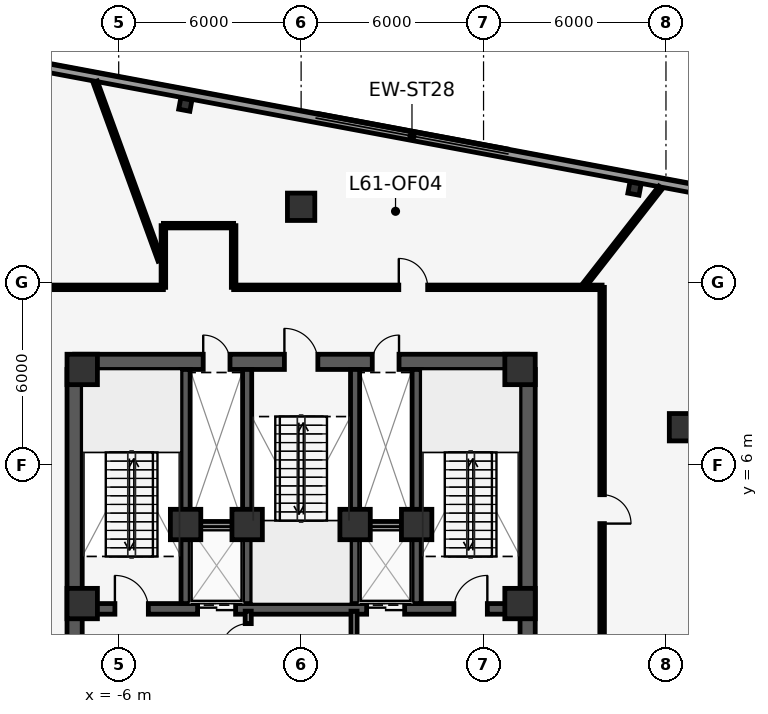
"""IFC4 building model, lengths in metres.
Left out: names, types, materials, properties, quantities, classifications, styles, units other than length and angle.
Written with IfcOpenShell. Run it as: python <this file> out.ifc"""

import sys

from ifc_helpers import new_model, si_unit, direction, frame, frame_2d, origin, origin_2d, place, context, subcontext, project, spatial, rectangle, i_section, extrude, element, fill, save


model = new_model("IFC4")
c1 = context("Model", 3, precision=1e-05, world=origin(), true_north=direction((0.0, 1.0)))
c2 = subcontext(c1, "Body", "Model", "MODEL_VIEW")
j1 = project(units=[si_unit("LENGTHUNIT", "METRE"), si_unit("PLANEANGLEUNIT", "RADIAN")], contexts=[c1])
p1 = place(None, origin())
s1 = spatial("IfcSite", under=j1, at=p1, CompositionType="ELEMENT")
p2 = place(p1, origin())
s2 = spatial("IfcBuilding", under=s1, at=p2, CompositionType="ELEMENT")
p3 = place(p2, frame((0.0, 0.0, 260.9)))
s3 = spatial("IfcBuildingStorey", under=s2, at=p3, CompositionType="ELEMENT", Elevation=260.9)
p4 = place(p3, frame((-7.45, 9.4, 0.0), z_axis=(0.0, 0.0, 1.0), x_axis=(1.0, 0.0, 0.0)))
e1 = element("IfcWall", 1, at=p4, inside=s3, PredefinedType="SHEAR", context=c2, shape_type="SweptSolid", body=[
    extrude(rectangle(XDim=14.9, YDim=0.5, at=frame_2d((7.45, 0.0))), origin(), (0.0, 0.0, 1.0), 4.35),
])
p5 = place(p4, frame((6.9, 0.0, 0.0)))
e2 = element("IfcOpeningElement", 2, at=p5, cuts=e1, PredefinedType="OPENING", context=c2, shape_type="SweptSolid", body=[
    extrude(rectangle(XDim=1.1, YDim=2.15, at=frame_2d((0.55, 1.075))), frame((0.0, 0.26, 0.0), z_axis=(0.0, -1.0, 0.0), x_axis=(1.0, 0.0, 0.0)), (0.0, 0.0, 1.0), 0.52),
])
p6 = place(p4, frame((4.23, 0.0, 0.0)))
e3 = element("IfcOpeningElement", 3, at=p6, cuts=e1, PredefinedType="OPENING", context=c2, shape_type="SweptSolid", body=[
    extrude(rectangle(XDim=0.88, YDim=2.15, at=frame_2d((0.44, 1.075))), frame((0.0, 0.26, 0.0), z_axis=(0.0, -1.0, 0.0), x_axis=(1.0, 0.0, 0.0)), (0.0, 0.0, 1.0), 0.52),
])
p7 = place(p4, frame((9.79, 0.0, 0.0)))
e4 = element("IfcOpeningElement", 4, at=p7, cuts=e1, PredefinedType="OPENING", context=c2, shape_type="SweptSolid", body=[
    extrude(rectangle(XDim=0.88, YDim=2.15, at=frame_2d((0.44, 1.075))), frame((0.0, 0.26, 0.0), z_axis=(0.0, -1.0, 0.0), x_axis=(1.0, 0.0, 0.0)), (0.0, 0.0, 1.0), 0.52),
])
p8 = place(p3, frame((-7.2, 1.275, 0.0), z_axis=(0.0, 0.0, 1.0), x_axis=(1.0, 0.0, 0.0)))
e5 = element("IfcWall", 5, at=p8, inside=s3, PredefinedType="SHEAR", context=c2, shape_type="SweptSolid", body=[
    extrude(rectangle(XDim=14.4, YDim=0.35, at=frame_2d((7.2, 0.0))), origin(), (0.0, 0.0, 1.0), 4.35),
])
p9 = place(p8, frame((3.795, 0.0, 0.0)))
e6 = element("IfcOpeningElement", 6, at=p9, cuts=e5, PredefinedType="OPENING", context=c2, shape_type="SweptSolid", body=[
    extrude(rectangle(XDim=1.25, YDim=2.25, at=frame_2d((0.625, 1.125))), frame((0.0, 0.185, 0.0), z_axis=(0.0, -1.0, 0.0), x_axis=(1.0, 0.0, 0.0)), (0.0, 0.0, 1.0), 0.37),
])
p10 = place(p8, frame((9.355, 0.0, 0.0)))
e7 = element("IfcOpeningElement", 7, at=p10, cuts=e5, PredefinedType="OPENING", context=c2, shape_type="SweptSolid", body=[
    extrude(rectangle(XDim=1.25, YDim=2.25, at=frame_2d((0.625, 1.125))), frame((0.0, 0.185, 0.0), z_axis=(0.0, -1.0, 0.0), x_axis=(1.0, 0.0, 0.0)), (0.0, 0.0, 1.0), 0.37),
])
p11 = place(p8, frame((1.075, 0.0, 0.0)))
e8 = element("IfcOpeningElement", 8, at=p11, cuts=e5, PredefinedType="OPENING", context=c2, shape_type="SweptSolid", body=[
    extrude(rectangle(XDim=1.1, YDim=2.15, at=frame_2d((0.55, 1.075))), frame((0.0, 0.185, 0.0), z_axis=(0.0, -1.0, 0.0), x_axis=(1.0, 0.0, 0.0)), (0.0, 0.0, 1.0), 0.37),
])
p12 = place(p8, frame((12.225, 0.0, 0.0)))
e9 = element("IfcOpeningElement", 9, at=p12, cuts=e5, PredefinedType="OPENING", context=c2, shape_type="SweptSolid", body=[
    extrude(rectangle(XDim=1.1, YDim=2.15, at=frame_2d((0.55, 1.075))), frame((0.0, 0.185, 0.0), z_axis=(0.0, -1.0, 0.0), x_axis=(1.0, 0.0, 0.0)), (0.0, 0.0, 1.0), 0.37),
])
for number, where, z_axis, x_axis in (
    (10, (-3.8, 1.45, 0.0), (0.0, 0.0, 1.0), (0.0, 1.0, 0.0)),
    (11, (-1.775, 1.45, 0.0), (0.0, 0.0, 1.0), (0.0, 1.0, 0.0)),
    (12, (1.775, 1.45, 0.0), (0.0, 0.0, 1.0), (0.0, 1.0, 0.0)),
    (13, (3.8, 1.45, 0.0), (0.0, 0.0, 1.0), (0.0, 1.0, 0.0)),
):
    element("IfcWall", number, at=place(p3, frame(where, z_axis=z_axis, x_axis=x_axis)), inside=s3, PredefinedType="SHEAR", context=c2, shape_type="SweptSolid", body=[
        extrude(rectangle(XDim=7.7, YDim=0.3, at=frame_2d((3.85, 0.0))), origin(), (0.0, 0.0, 1.0), 4.35),
    ])
for number, where, z_axis, x_axis in (
    (14, (-7.45, 0.1, 0.0), (0.0, 0.0, 1.0), (0.0, 1.0, 0.0)),
    (15, (7.45, 0.1, 0.0), (0.0, 0.0, 1.0), (0.0, 1.0, 0.0)),
):
    element("IfcWall", number, at=place(p3, frame(where, z_axis=z_axis, x_axis=x_axis)), inside=s3, PredefinedType="SHEAR", context=c2, shape_type="SweptSolid", body=[
        extrude(rectangle(XDim=9.05, YDim=0.5, at=frame_2d((4.525, 0.0))), origin(), (0.0, 0.0, 1.0), 4.35),
    ])
for number, where, z_axis, x_axis in (
    (16, (7.2, 1.45, 0.0), (0.0, 0.0, 1.0), (1.0, 0.0, 0.0)),
    (17, (7.2, 9.15, 0.0), (0.0, 0.0, 1.0), (1.0, 0.0, 0.0)),
    (18, (-7.2, 9.15, 0.0), (0.0, 0.0, 1.0), (1.0, 0.0, 0.0)),
    (19, (-7.2, 1.45, 0.0), (0.0, 0.0, 1.0), (1.0, 0.0, 0.0)),
    (20, (-3.8, 4.05, 0.0), (0.0, 0.0, 1.0), (1.0, 0.0, 0.0)),
    (21, (3.8, 4.05, 0.0), (0.0, 0.0, 1.0), (1.0, 0.0, 0.0)),
    (22, (-1.775, 4.05, 0.0), (0.0, 0.0, 1.0), (1.0, 0.0, 0.0)),
    (23, (1.775, 4.05, 0.0), (0.0, 0.0, 1.0), (1.0, 0.0, 0.0)),
):
    element("IfcColumn", number, at=place(p3, frame(where, z_axis=z_axis, x_axis=x_axis)), inside=s3, PredefinedType="COLUMN", context=c2, shape_type="SweptSolid", body=[
        extrude(rectangle(XDim=1.0, YDim=1.0, at=origin_2d()), origin(), (0.0, 0.0, 1.0), 4.6),
    ])
for number, where, z_axis, x_axis in (
    (24, (12.56, 7.25, 0.0), (0.0, 0.0, 1.0), (1.0, 0.0, 0.0)),
    (25, (0.0, 14.5, 0.0), (0.0, 0.0, 1.0), (1.0, 0.0, 0.0)),
):
    element("IfcColumn", number, at=place(p3, frame(where, z_axis=z_axis, x_axis=x_axis)), inside=s3, PredefinedType="COLUMN", context=c2, shape_type="SweptSolid", body=[
        extrude(rectangle(XDim=0.9, YDim=0.9, at=origin_2d()), origin(), (0.0, 0.0, 1.0), 4.6),
    ])
for number, where, z_axis, x_axis in (
    (26, (10.965, 15.099, 0.0), (0.0, 0.0, 1.0), (-0.983, 0.184, 0.0)),
    (27, (-3.809, 17.859, 0.0), (0.0, 0.0, 1.0), (-0.983, 0.184, 0.0)),
):
    element("IfcColumn", number, at=place(p3, frame(where, z_axis=z_axis, x_axis=x_axis)), inside=s3, PredefinedType="COLUMN", context=c2, shape_type="SweptSolid", body=[
        extrude(i_section(OverallWidth=0.373, OverallDepth=0.373, WebThickness=0.016, FlangeThickness=0.026, at=origin_2d()), origin(), (0.0, 0.0, 1.0), 4.6),
    ])
p13 = place(p3, frame((-19.042, 21.066, 0.0), z_axis=(0.0, 0.0, 1.0), x_axis=(0.982948140881, -0.183882985453, 0.0)))
e28 = element("IfcWall", 28, at=p13, inside=s3, PredefinedType="STANDARD", context=c2, shape_type="SweptSolid", body=[
    extrude(rectangle(XDim=46.163, YDim=0.28, at=frame_2d((23.081, 0.0))), origin(), (0.0, 0.0, 1.0), 4.35),
])
p14 = place(p13, frame((5.731, 0.0, 0.85)))
e29 = element("IfcOpeningElement", 29, at=p14, cuts=e28, PredefinedType="OPENING", context=c2, shape_type="SweptSolid", body=[
    extrude(rectangle(XDim=1.1, YDim=2.15, at=frame_2d((0.55, 1.075))), frame((0.0, 0.15, 0.0), z_axis=(0.0, -1.0, 0.0), x_axis=(1.0, 0.0, 0.0)), (0.0, 0.0, 1.0), 0.3),
])
p15 = place(p13, frame((33.731, 0.0, 0.85)))
e30 = element("IfcOpeningElement", 30, at=p15, cuts=e28, PredefinedType="OPENING", context=c2, shape_type="SweptSolid", body=[
    extrude(rectangle(XDim=1.1, YDim=2.15, at=frame_2d((0.55, 1.075))), frame((0.0, 0.15, 0.0), z_axis=(0.0, -1.0, 0.0), x_axis=(1.0, 0.0, 0.0)), (0.0, 0.0, 1.0), 0.3),
])
p16 = place(p13, frame((39.331, 0.0, 0.85)))
e31 = element("IfcOpeningElement", 31, at=p16, cuts=e28, PredefinedType="OPENING", context=c2, shape_type="SweptSolid", body=[
    extrude(rectangle(XDim=1.1, YDim=2.15, at=frame_2d((0.55, 1.075))), frame((0.0, 0.15, 0.0), z_axis=(0.0, -1.0, 0.0), x_axis=(1.0, 0.0, 0.0)), (0.0, 0.0, 1.0), 0.3),
])
p17 = place(p3, frame((28.531, 6.268, 0.0), z_axis=(0.0, 0.0, 1.0), x_axis=(-0.656055748756, -0.754712431674, 0.0)))
e32 = element("IfcWall", 32, at=p17, inside=s3, PredefinedType="STANDARD", context=c2, shape_type="SweptSolid", body=[
    extrude(rectangle(XDim=46.897, YDim=0.28, at=frame_2d((23.448, 0.0))), origin(), (0.0, 0.0, 1.0), 4.35),
])
p18 = place(p17, frame((6.099, 0.0, 0.85)))
e33 = element("IfcOpeningElement", 33, at=p18, cuts=e32, PredefinedType="OPENING", context=c2, shape_type="SweptSolid", body=[
    extrude(rectangle(XDim=1.1, YDim=2.15, at=frame_2d((0.55, 1.075))), frame((0.0, 0.15, 0.0), z_axis=(0.0, -1.0, 0.0), x_axis=(1.0, 0.0, 0.0)), (0.0, 0.0, 1.0), 0.3),
])
p19 = place(p17, frame((11.698, 0.0, 0.85)))
e34 = element("IfcOpeningElement", 34, at=p19, cuts=e32, PredefinedType="OPENING", context=c2, shape_type="SweptSolid", body=[
    extrude(rectangle(XDim=1.1, YDim=2.15, at=frame_2d((0.55, 1.075))), frame((0.0, 0.15, 0.0), z_axis=(0.0, -1.0, 0.0), x_axis=(1.0, 0.0, 0.0)), (0.0, 0.0, 1.0), 0.3),
])
p20 = place(p17, frame((39.698, 0.0, 0.85)))
e35 = element("IfcOpeningElement", 35, at=p20, cuts=e32, PredefinedType="OPENING", context=c2, shape_type="SweptSolid", body=[
    extrude(rectangle(XDim=1.1, YDim=2.15, at=frame_2d((0.55, 1.075))), frame((0.0, 0.15, 0.0), z_axis=(0.0, -1.0, 0.0), x_axis=(1.0, 0.0, 0.0)), (0.0, 0.0, 1.0), 0.3),
])
for number, where, z_axis, x_axis in (
    (36, (-3.65, 4.05, 0.0), (0.0, 0.0, 1.0), (1.0, 0.0, 0.0)),
    (37, (1.92, 4.05, 0.0), (0.0, 0.0, 1.0), (1.0, 0.0, 0.0)),
):
    element("IfcWall", number, at=place(p3, frame(where, z_axis=z_axis, x_axis=x_axis)), inside=s3, PredefinedType="PARTITIONING", context=c2, shape_type="SweptSolid", body=[
        extrude(rectangle(XDim=1.73, YDim=0.2, at=frame_2d((0.865, 0.0))), origin(), (0.0, 0.0, 1.0), 4.35),
    ])
p21 = place(p3, frame((-1.74, -1.78, 0.0), z_axis=(0.0, 0.0, 1.0), x_axis=(0.0, 1.0, 0.0)))
e38 = element("IfcWall", 38, at=p21, inside=s3, PredefinedType="PARTITIONING", context=c2, shape_type="SweptSolid", body=[
    extrude(rectangle(XDim=2.98, YDim=0.2, at=frame_2d((1.49, 0.0))), origin(), (0.0, 0.0, 1.0), 4.35),
])
p22 = place(p21, frame((1.69, 0.0, 0.0)))
e39 = element("IfcOpeningElement", 39, at=p22, cuts=e38, PredefinedType="OPENING", context=c2, shape_type="SweptSolid", body=[
    extrude(rectangle(XDim=0.88, YDim=2.15, at=frame_2d((0.44, 1.075))), frame((0.0, 0.11, 0.0), z_axis=(0.0, -1.0, 0.0), x_axis=(1.0, 0.0, 0.0)), (0.0, 0.0, 1.0), 0.22),
])
p23 = place(p3, frame((1.74, -1.78, 0.0), z_axis=(0.0, 0.0, 1.0), x_axis=(0.0, 1.0, 0.0)))
e40 = element("IfcWall", 40, at=p23, inside=s3, PredefinedType="PARTITIONING", context=c2, shape_type="SweptSolid", body=[
    extrude(rectangle(XDim=2.98, YDim=0.2, at=frame_2d((1.49, 0.0))), origin(), (0.0, 0.0, 1.0), 4.35),
])
p24 = place(p23, frame((0.24, 0.0, 0.0)))
e41 = element("IfcOpeningElement", 41, at=p24, cuts=e40, PredefinedType="OPENING", context=c2, shape_type="SweptSolid", body=[
    extrude(rectangle(XDim=0.88, YDim=2.15, at=frame_2d((0.44, 1.075))), frame((0.0, 0.11, 0.0), z_axis=(0.0, -1.0, 0.0), x_axis=(1.0, 0.0, 0.0)), (0.0, 0.0, 1.0), 0.22),
])
p25 = place(p3, frame((-9.9, 11.85, 0.0), z_axis=(0.0, 0.0, 1.0), x_axis=(1.0, 0.0, 0.0)))
e42 = element("IfcWall", 42, at=p25, inside=s3, PredefinedType="PARTITIONING", context=c2, shape_type="SweptSolid", body=[
    extrude(rectangle(XDim=5.37, YDim=0.15, at=frame_2d((2.685, 0.0))), origin(), (0.0, 0.0, 1.0), 4.35),
])
p26 = place(p3, frame((-4.53, 11.85, 0.0), z_axis=(0.0, 0.0, 1.0), x_axis=(0.0, 1.0, 0.0)))
e43 = element("IfcWall", 43, at=p26, inside=s3, PredefinedType="PARTITIONING", context=c2, shape_type="SweptSolid", body=[
    extrude(rectangle(XDim=2.03, YDim=0.15, at=frame_2d((1.015, 0.0))), origin(), (0.0, 0.0, 1.0), 4.35),
])
p27 = place(p3, frame((-4.53, 13.88, 0.0), z_axis=(0.0, 0.0, 1.0), x_axis=(1.0, 0.0, 0.0)))
e44 = element("IfcWall", 44, at=p27, inside=s3, PredefinedType="PARTITIONING", context=c2, shape_type="SweptSolid", body=[
    extrude(rectangle(XDim=2.31, YDim=0.15, at=frame_2d((1.155, 0.0))), origin(), (0.0, 0.0, 1.0), 4.35),
])
p28 = place(p3, frame((-2.22, 13.88, 0.0), z_axis=(0.0, 0.0, 1.0), x_axis=(0.0, -1.0, 0.0)))
e45 = element("IfcWall", 45, at=p28, inside=s3, PredefinedType="PARTITIONING", context=c2, shape_type="SweptSolid", body=[
    extrude(rectangle(XDim=2.03, YDim=0.15, at=frame_2d((1.015, 0.0))), origin(), (0.0, 0.0, 1.0), 4.35),
])
p29 = place(p3, frame((-2.22, 11.85, 0.0), z_axis=(0.0, 0.0, 1.0), x_axis=(1.0, 0.0, 0.0)))
e46 = element("IfcWall", 46, at=p29, inside=s3, PredefinedType="PARTITIONING", context=c2, shape_type="SweptSolid", body=[
    extrude(rectangle(XDim=12.12, YDim=0.15, at=frame_2d((6.06, 0.0))), origin(), (0.0, 0.0, 1.0), 4.35),
])
p30 = place(p29, frame((5.432, 0.0, 0.0)))
e47 = element("IfcOpeningElement", 47, at=p30, cuts=e46, PredefinedType="OPENING", context=c2, shape_type="SweptSolid", body=[
    extrude(rectangle(XDim=0.95, YDim=2.15, at=frame_2d((0.475, 1.075))), frame((0.0, 0.085, 0.0), z_axis=(0.0, -1.0, 0.0), x_axis=(1.0, 0.0, 0.0)), (0.0, 0.0, 1.0), 0.17),
])
p31 = place(p3, frame((9.9, 11.85, 0.0), z_axis=(0.0, 0.0, 1.0), x_axis=(0.0, -1.0, 0.0)))
e48 = element("IfcWall", 48, at=p31, inside=s3, PredefinedType="PARTITIONING", context=c2, shape_type="SweptSolid", body=[
    extrude(rectangle(XDim=22.634, YDim=0.15, at=frame_2d((11.317, 0.0))), origin(), (0.0, 0.0, 1.0), 4.35),
])
p32 = place(p31, frame((17.885, 0.0, 0.0)))
e49 = element("IfcOpeningElement", 49, at=p32, cuts=e48, PredefinedType="OPENING", context=c2, shape_type="SweptSolid", body=[
    extrude(rectangle(XDim=0.95, YDim=2.15, at=frame_2d((0.475, 1.075))), frame((0.0, 0.085, 0.0), z_axis=(0.0, -1.0, 0.0), x_axis=(1.0, 0.0, 0.0)), (0.0, 0.0, 1.0), 0.17),
])
p33 = place(p31, frame((6.82, 0.0, 0.0)))
e50 = element("IfcOpeningElement", 50, at=p33, cuts=e48, PredefinedType="OPENING", context=c2, shape_type="SweptSolid", body=[
    extrude(rectangle(XDim=0.95, YDim=2.15, at=frame_2d((0.475, 1.075))), frame((0.0, 0.085, 0.0), z_axis=(0.0, -1.0, 0.0), x_axis=(1.0, 0.0, 0.0)), (0.0, 0.0, 1.0), 0.17),
])
p34 = place(p3, frame((9.34, 11.955, 0.0), z_axis=(0.0, 0.0, 1.0), x_axis=(0.615673396763, 0.788001439414, 0.0)))
e51 = element("IfcWall", 51, at=p34, inside=s3, PredefinedType="PARTITIONING", context=c2, shape_type="SweptSolid", body=[
    extrude(rectangle(XDim=4.035, YDim=0.15, at=frame_2d((2.018, 0.0))), origin(), (0.0, 0.0, 1.0), 4.35),
])
p35 = place(p3, frame((-4.635, 12.735, 0.0), z_axis=(0.0, 0.0, 1.0), x_axis=(-0.34201562332, 0.939694265921, 0.0)))
e52 = element("IfcWall", 52, at=p35, inside=s3, PredefinedType="PARTITIONING", context=c2, shape_type="SweptSolid", body=[
    extrude(rectangle(XDim=6.257, YDim=0.15, at=frame_2d((3.128, 0.0))), origin(), (0.0, 0.0, 1.0), 4.35),
])
p36 = place(p9, origin())
e53 = element("IfcDoor", 53, at=p36, inside=s3, OperationType="DOUBLE_DOOR_SLIDING", PredefinedType="DOOR", context=c2, shape_type="SweptSolid", body=[
    extrude(rectangle(XDim=1.25, YDim=2.25, at=frame_2d((0.625, 1.125))), frame((0.0, 0.025, 0.0), z_axis=(0.0, -1.0, 0.0), x_axis=(1.0, 0.0, 0.0)), (0.0, 0.0, 1.0), 0.05),
])
fill(e6, e53)
p37 = place(p10, origin())
e54 = element("IfcDoor", 54, at=p37, inside=s3, OperationType="DOUBLE_DOOR_SLIDING", PredefinedType="DOOR", context=c2, shape_type="SweptSolid", body=[
    extrude(rectangle(XDim=1.25, YDim=2.25, at=frame_2d((0.625, 1.125))), frame((0.0, 0.025, 0.0), z_axis=(0.0, -1.0, 0.0), x_axis=(1.0, 0.0, 0.0)), (0.0, 0.0, 1.0), 0.05),
])
fill(e7, e54)
p38 = place(p11, origin())
e55 = element("IfcDoor", 55, at=p38, inside=s3, OperationType="SINGLE_SWING_LEFT", PredefinedType="DOOR", context=c2, shape_type="SweptSolid", body=[
    extrude(rectangle(XDim=1.1, YDim=2.15, at=frame_2d((0.55, 1.075))), frame((0.0, 0.025, 0.0), z_axis=(0.0, -1.0, 0.0), x_axis=(1.0, 0.0, 0.0)), (0.0, 0.0, 1.0), 0.05),
])
fill(e8, e55)
p39 = place(p12, origin())
e56 = element("IfcDoor", 56, at=p39, inside=s3, OperationType="SINGLE_SWING_RIGHT", PredefinedType="DOOR", context=c2, shape_type="SweptSolid", body=[
    extrude(rectangle(XDim=1.1, YDim=2.15, at=frame_2d((0.55, 1.075))), frame((0.0, 0.025, 0.0), z_axis=(0.0, -1.0, 0.0), x_axis=(1.0, 0.0, 0.0)), (0.0, 0.0, 1.0), 0.05),
])
fill(e9, e56)
p40 = place(p5, origin())
e57 = element("IfcDoor", 57, at=p40, inside=s3, OperationType="SINGLE_SWING_LEFT", PredefinedType="DOOR", context=c2, shape_type="SweptSolid", body=[
    extrude(rectangle(XDim=1.1, YDim=2.15, at=frame_2d((0.55, 1.075))), frame((0.0, 0.025, 0.0), z_axis=(0.0, -1.0, 0.0), x_axis=(1.0, 0.0, 0.0)), (0.0, 0.0, 1.0), 0.05),
])
fill(e2, e57)
p41 = place(p6, origin())
e58 = element("IfcDoor", 58, at=p41, inside=s3, OperationType="SINGLE_SWING_LEFT", PredefinedType="DOOR", context=c2, shape_type="SweptSolid", body=[
    extrude(rectangle(XDim=0.88, YDim=2.15, at=frame_2d((0.44, 1.075))), frame((0.0, 0.025, 0.0), z_axis=(0.0, -1.0, 0.0), x_axis=(1.0, 0.0, 0.0)), (0.0, 0.0, 1.0), 0.05),
])
fill(e3, e58)
p42 = place(p7, origin())
e59 = element("IfcDoor", 59, at=p42, inside=s3, OperationType="SINGLE_SWING_RIGHT", PredefinedType="DOOR", context=c2, shape_type="SweptSolid", body=[
    extrude(rectangle(XDim=0.88, YDim=2.15, at=frame_2d((0.44, 1.075))), frame((0.0, 0.025, 0.0), z_axis=(0.0, -1.0, 0.0), x_axis=(1.0, 0.0, 0.0)), (0.0, 0.0, 1.0), 0.05),
])
fill(e4, e59)
p43 = place(p22, origin())
e60 = element("IfcDoor", 60, at=p43, inside=s3, OperationType="SINGLE_SWING_LEFT", PredefinedType="DOOR", context=c2, shape_type="SweptSolid", body=[
    extrude(rectangle(XDim=0.88, YDim=2.15, at=frame_2d((0.44, 1.075))), frame((0.0, 0.025, 0.0), z_axis=(0.0, -1.0, 0.0), x_axis=(1.0, 0.0, 0.0)), (0.0, 0.0, 1.0), 0.05),
])
fill(e39, e60)
p44 = place(p33, origin())
e61 = element("IfcDoor", 61, at=p44, inside=s3, OperationType="SINGLE_SWING_RIGHT", PredefinedType="DOOR", context=c2, shape_type="SweptSolid", body=[
    extrude(rectangle(XDim=0.95, YDim=2.15, at=frame_2d((0.475, 1.075))), frame((0.0, 0.025, 0.0), z_axis=(0.0, -1.0, 0.0), x_axis=(1.0, 0.0, 0.0)), (0.0, 0.0, 1.0), 0.05),
])
fill(e50, e61)
p45 = place(p30, origin())
e62 = element("IfcDoor", 62, at=p45, inside=s3, OperationType="SINGLE_SWING_LEFT", PredefinedType="DOOR", context=c2, shape_type="SweptSolid", body=[
    extrude(rectangle(XDim=0.95, YDim=2.15, at=frame_2d((0.475, 1.075))), frame((0.0, 0.025, 0.0), z_axis=(0.0, -1.0, 0.0), x_axis=(1.0, 0.0, 0.0)), (0.0, 0.0, 1.0), 0.05),
])
fill(e47, e62)
save(model, sys.argv[1])
